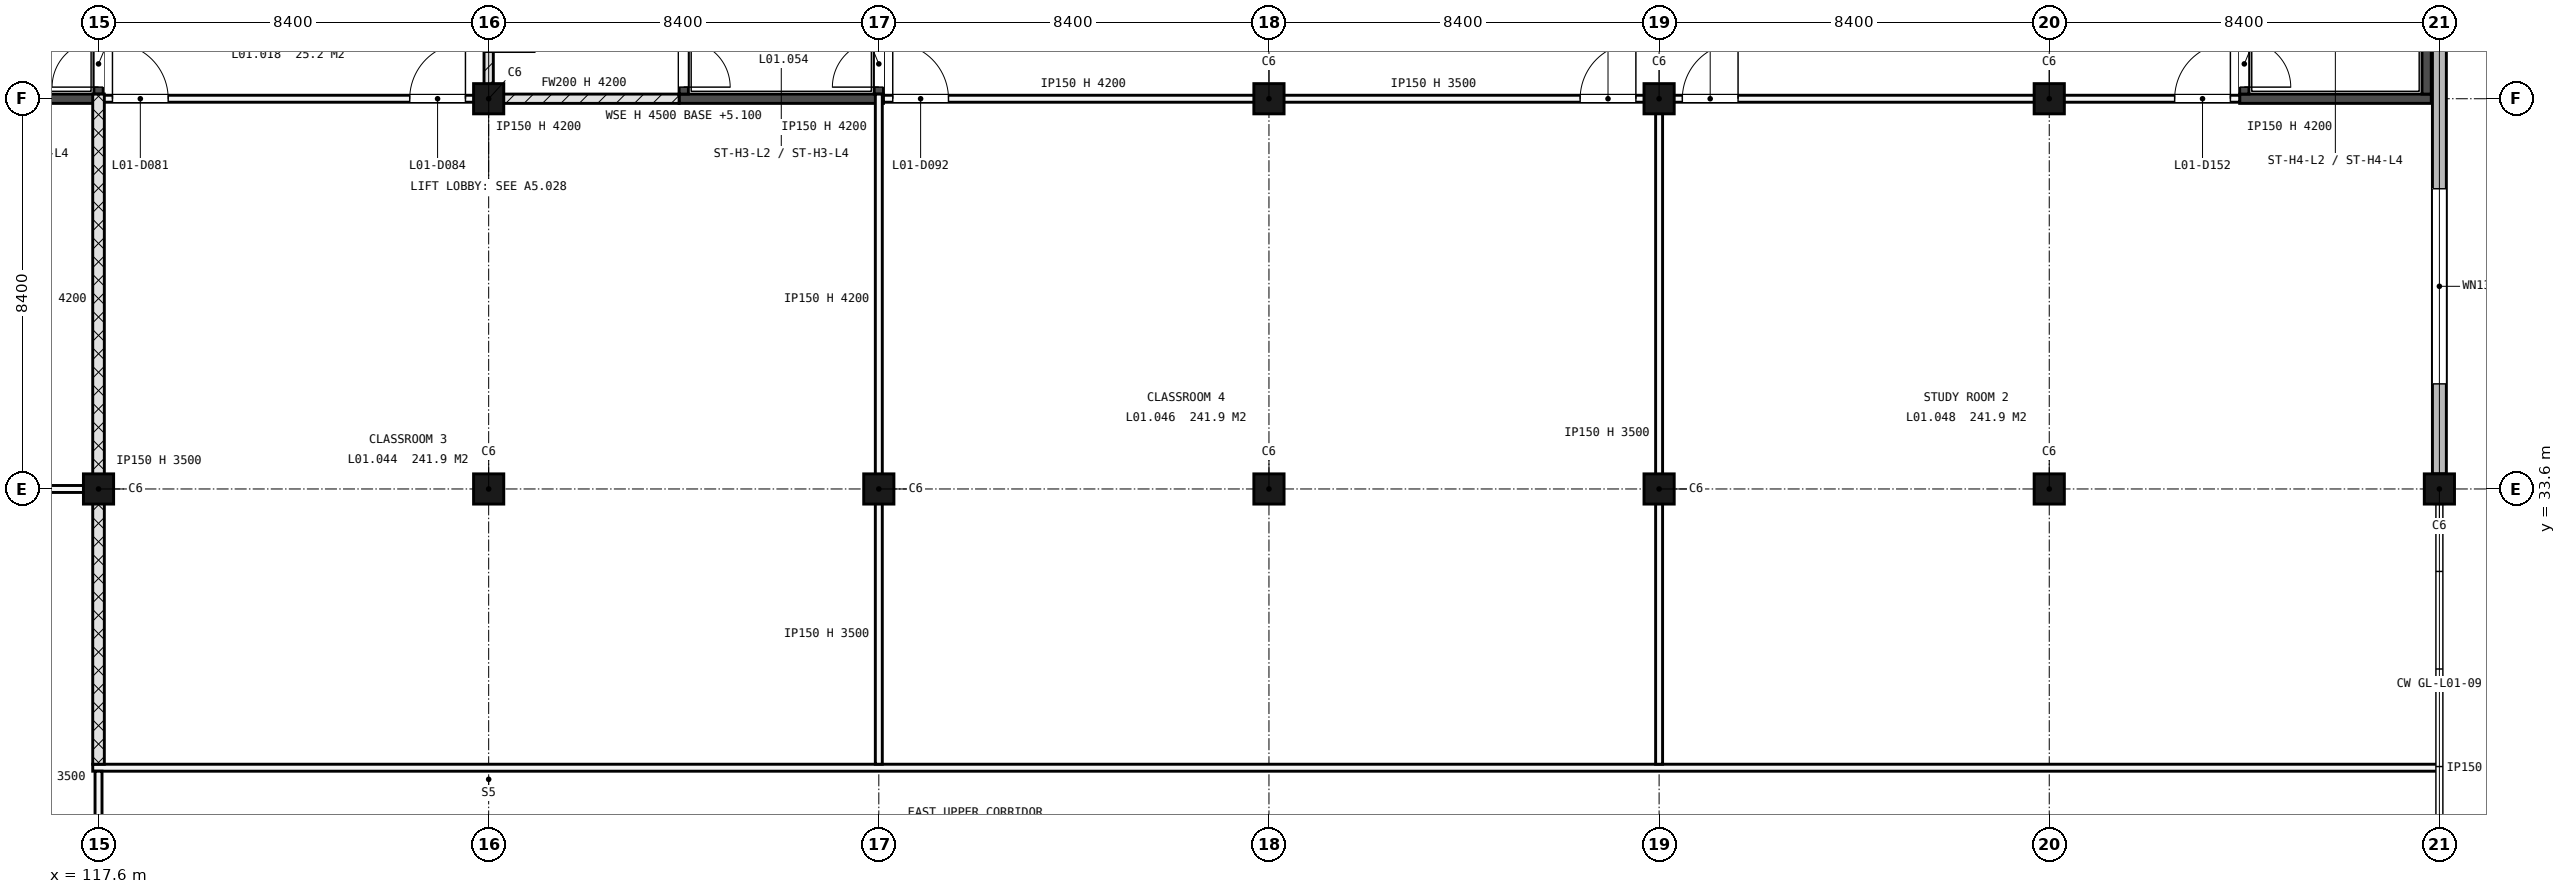
"""IFC4 building model, lengths in metres.
Left out: names, types, materials, properties, quantities, classifications, styles, units other than length and angle.
Written with IfcOpenShell. Run it as: python <this file> out.ifc"""

import sys

from ifc_helpers import new_model, si_unit, direction, frame, frame_2d, origin, origin_2d, place, context, subcontext, project, spatial, rectangle, extrude, element, fill, save


model = new_model("IFC4")
c1 = context("Model", 3, precision=1e-05, world=origin(), true_north=direction((0.0, 1.0)))
c2 = subcontext(c1, "Body", "Model", "MODEL_VIEW")
j1 = project(units=[si_unit("LENGTHUNIT", "METRE"), si_unit("PLANEANGLEUNIT", "RADIAN")], contexts=[c1])
p1 = place(None, origin())
s1 = spatial("IfcSite", under=j1, at=p1, CompositionType="ELEMENT")
p2 = place(p1, origin())
s2 = spatial("IfcBuilding", under=s1, at=p2, CompositionType="ELEMENT")
p3 = place(p2, frame((0.0, 0.0, 5.4)))
s3 = spatial("IfcBuildingStorey", under=s2, at=p3, CompositionType="ELEMENT", Elevation=5.4)
for number, where, z_axis, x_axis in (
    (1, (117.6, 33.6, -0.3), (0.0, 0.0, 1.0), (1.0, 0.0, 0.0)),
    (2, (126.0, 33.6, -0.3), (0.0, 0.0, 1.0), (1.0, 0.0, 0.0)),
    (3, (126.0, 42.0, -0.3), (0.0, 0.0, 1.0), (1.0, 0.0, 0.0)),
    (4, (134.4, 33.6, -0.3), (0.0, 0.0, 1.0), (1.0, 0.0, 0.0)),
    (5, (142.8, 33.6, -0.3), (0.0, 0.0, 1.0), (1.0, 0.0, 0.0)),
    (6, (142.8, 42.0, -0.3), (0.0, 0.0, 1.0), (1.0, 0.0, 0.0)),
    (7, (151.2, 33.6, -0.3), (0.0, 0.0, 1.0), (1.0, 0.0, 0.0)),
    (8, (151.2, 42.0, -0.3), (0.0, 0.0, 1.0), (1.0, 0.0, 0.0)),
    (9, (159.6, 33.6, -0.3), (0.0, 0.0, 1.0), (1.0, 0.0, 0.0)),
    (10, (159.6, 42.0, -0.3), (0.0, 0.0, 1.0), (1.0, 0.0, 0.0)),
    (11, (168.0, 33.6, -0.3), (0.0, 0.0, 1.0), (1.0, 0.0, 0.0)),
):
    element("IfcColumn", number, at=place(p3, frame(where, z_axis=z_axis, x_axis=x_axis)), inside=s3, PredefinedType="COLUMN", context=c2, shape_type="SweptSolid", body=[
        extrude(rectangle(XDim=0.65, YDim=0.65, at=origin_2d()), origin(), (0.0, 0.0, 1.0), 4.55),
    ])
p4 = place(p3, frame((168.0, 33.925, 0.0), z_axis=(0.0, 0.0, 1.0), x_axis=(0.0, 1.0, 0.0)))
e12 = element("IfcWall", 12, at=p4, inside=s3, PredefinedType="STANDARD", context=c2, shape_type="SweptSolid", body=[
    extrude(rectangle(XDim=16.475, YDim=0.3, at=frame_2d((8.237, 0.0))), origin(), (0.0, 0.0, 1.0), 4.2),
])
p5 = place(p4, frame((1.938, 0.0, 2.4)))
e13 = element("IfcOpeningElement", 13, at=p5, cuts=e12, PredefinedType="OPENING", context=c2, shape_type="SweptSolid", body=[
    extrude(rectangle(XDim=4.2, YDim=0.9, at=frame_2d((2.1, 0.45))), frame((0.0, 0.16, 0.0), z_axis=(0.0, -1.0, 0.0), x_axis=(1.0, 0.0, 0.0)), (0.0, 0.0, 1.0), 0.32),
])
p6 = place(p3, frame((130.1, 42.0, -0.3), z_axis=(0.0, 0.0, 1.0), x_axis=(1.0, 0.0, 0.0)))
e14 = element("IfcWall", 14, at=p6, inside=s3, PredefinedType="SHEAR", context=c2, shape_type="SweptSolid", body=[
    extrude(rectangle(XDim=4.4, YDim=0.2, at=frame_2d((2.2, 0.0))), origin(), (0.0, 0.0, 1.0), 4.5),
])
p7 = place(p3, frame((130.2, 42.1, -0.3), z_axis=(0.0, 0.0, 1.0), x_axis=(0.0, 1.0, 0.0)))
e15 = element("IfcWall", 15, at=p7, inside=s3, PredefinedType="SHEAR", context=c2, shape_type="SweptSolid", body=[
    extrude(rectangle(XDim=7.925, YDim=0.2, at=frame_2d((3.962, 0.0))), origin(), (0.0, 0.0, 1.0), 4.5),
])
p8 = place(p7, frame((0.15, 0.0, 0.3)))
e16 = element("IfcOpeningElement", 16, at=p8, cuts=e15, PredefinedType="OPENING", context=c2, shape_type="SweptSolid", body=[
    extrude(rectangle(XDim=1.0, YDim=2.1, at=frame_2d((0.5, 1.05))), frame((0.0, 0.11, 0.0), z_axis=(0.0, -1.0, 0.0), x_axis=(1.0, 0.0, 0.0)), (0.0, 0.0, 1.0), 0.22),
])
p9 = place(p3, frame((134.4, 42.1, -0.3), z_axis=(0.0, 0.0, 1.0), x_axis=(0.0, 1.0, 0.0)))
e17 = element("IfcWall", 17, at=p9, inside=s3, PredefinedType="SHEAR", context=c2, shape_type="SweptSolid", body=[
    extrude(rectangle(XDim=7.925, YDim=0.2, at=frame_2d((3.962, 0.0))), origin(), (0.0, 0.0, 1.0), 4.5),
])
p10 = place(p9, frame((0.15, 0.0, 0.3)))
e18 = element("IfcOpeningElement", 18, at=p10, cuts=e17, PredefinedType="OPENING", context=c2, shape_type="SweptSolid", body=[
    extrude(rectangle(XDim=1.0, YDim=2.1, at=frame_2d((0.5, 1.05))), frame((0.0, 0.11, 0.0), z_axis=(0.0, -1.0, 0.0), x_axis=(1.0, 0.0, 0.0)), (0.0, 0.0, 1.0), 0.22),
])
p11 = place(p3, frame((163.7, 42.0, -0.3), z_axis=(0.0, 0.0, 1.0), x_axis=(1.0, 0.0, 0.0)))
e19 = element("IfcWall", 19, at=p11, inside=s3, PredefinedType="SHEAR", context=c2, shape_type="SweptSolid", body=[
    extrude(rectangle(XDim=4.125, YDim=0.2, at=frame_2d((2.062, 0.0))), origin(), (0.0, 0.0, 1.0), 4.5),
])
p12 = place(p3, frame((163.8, 42.1, -0.3), z_axis=(0.0, 0.0, 1.0), x_axis=(0.0, 1.0, 0.0)))
e20 = element("IfcWall", 20, at=p12, inside=s3, PredefinedType="SHEAR", context=c2, shape_type="SweptSolid", body=[
    extrude(rectangle(XDim=7.925, YDim=0.2, at=frame_2d((3.962, 0.0))), origin(), (0.0, 0.0, 1.0), 4.5),
])
p13 = place(p12, frame((0.15, 0.0, 0.3)))
e21 = element("IfcOpeningElement", 21, at=p13, cuts=e20, PredefinedType="OPENING", context=c2, shape_type="SweptSolid", body=[
    extrude(rectangle(XDim=1.0, YDim=2.1, at=frame_2d((0.5, 1.05))), frame((0.0, 0.11, 0.0), z_axis=(0.0, -1.0, 0.0), x_axis=(1.0, 0.0, 0.0)), (0.0, 0.0, 1.0), 0.22),
])
p14 = place(p3, frame((167.725, 42.1, -0.3), z_axis=(0.0, 0.0, 1.0), x_axis=(0.0, 1.0, 0.0)))
e22 = element("IfcWall", 22, at=p14, inside=s3, PredefinedType="SHEAR", context=c2, shape_type="SweptSolid", body=[
    extrude(rectangle(XDim=7.925, YDim=0.2, at=frame_2d((3.962, 0.0))), origin(), (0.0, 0.0, 1.0), 4.5),
])
p15 = place(p3, frame((113.3, 42.0, -0.3), z_axis=(0.0, 0.0, 1.0), x_axis=(1.0, 0.0, 0.0)))
e23 = element("IfcWall", 23, at=p15, inside=s3, PredefinedType="SHEAR", context=c2, shape_type="SweptSolid", body=[
    extrude(rectangle(XDim=4.4, YDim=0.2, at=frame_2d((2.2, 0.0))), origin(), (0.0, 0.0, 1.0), 4.5),
])
p16 = place(p3, frame((117.6, 42.1, -0.3), z_axis=(0.0, 0.0, 1.0), x_axis=(0.0, 1.0, 0.0)))
e24 = element("IfcWall", 24, at=p16, inside=s3, PredefinedType="SHEAR", context=c2, shape_type="SweptSolid", body=[
    extrude(rectangle(XDim=7.925, YDim=0.2, at=frame_2d((3.962, 0.0))), origin(), (0.0, 0.0, 1.0), 4.5),
])
p17 = place(p16, frame((0.15, 0.0, 0.3)))
e25 = element("IfcOpeningElement", 25, at=p17, cuts=e24, PredefinedType="OPENING", context=c2, shape_type="SweptSolid", body=[
    extrude(rectangle(XDim=1.0, YDim=2.1, at=frame_2d((0.5, 1.05))), frame((0.0, 0.11, 0.0), z_axis=(0.0, -1.0, 0.0), x_axis=(1.0, 0.0, 0.0)), (0.0, 0.0, 1.0), 0.22),
])
p18 = place(p3, frame((117.475, 27.6, 0.0), z_axis=(0.0, 0.0, 1.0), x_axis=(1.0, 0.0, 0.0)))
e26 = element("IfcWall", 26, at=p18, inside=s3, PredefinedType="PARTITIONING", context=c2, shape_type="SweptSolid", body=[
    extrude(rectangle(XDim=50.525, YDim=0.15, at=frame_2d((25.262, 0.0))), origin(), (0.0, 0.0, 1.0), 4.2),
])
p19 = place(p3, frame((92.475, 33.6, 0.0), z_axis=(0.0, 0.0, 1.0), x_axis=(1.0, 0.0, 0.0)))
e27 = element("IfcWall", 27, at=p19, inside=s3, PredefinedType="PARTITIONING", context=c2, shape_type="SweptSolid", body=[
    extrude(rectangle(XDim=25.0, YDim=0.15, at=frame_2d((12.5, 0.0))), origin(), (0.0, 0.0, 1.0), 3.5),
])
p20 = place(p3, frame((117.7, 42.0, 0.0), z_axis=(0.0, 0.0, 1.0), x_axis=(1.0, 0.0, 0.0)))
e28 = element("IfcWall", 28, at=p20, inside=s3, PredefinedType="PARTITIONING", context=c2, shape_type="SweptSolid", body=[
    extrude(rectangle(XDim=8.3, YDim=0.15, at=frame_2d((4.15, 0.0))), origin(), (0.0, 0.0, 1.0), 4.2),
])
p21 = place(p20, frame((0.2, 0.0, 0.0)))
e29 = element("IfcOpeningElement", 29, at=p21, cuts=e28, PredefinedType="OPENING", context=c2, shape_type="SweptSolid", body=[
    extrude(rectangle(XDim=1.2, YDim=2.1, at=frame_2d((0.6, 1.05))), frame((0.0, 0.085, 0.0), z_axis=(0.0, -1.0, 0.0), x_axis=(1.0, 0.0, 0.0)), (0.0, 0.0, 1.0), 0.17),
])
p22 = place(p20, frame((6.6, 0.0, 0.0)))
e30 = element("IfcOpeningElement", 30, at=p22, cuts=e28, PredefinedType="OPENING", context=c2, shape_type="SweptSolid", body=[
    extrude(rectangle(XDim=1.2, YDim=2.1, at=frame_2d((0.6, 1.05))), frame((0.0, 0.085, 0.0), z_axis=(0.0, -1.0, 0.0), x_axis=(1.0, 0.0, 0.0)), (0.0, 0.0, 1.0), 0.17),
])
p23 = place(p3, frame((126.0, 42.0, 0.0), z_axis=(0.0, 0.0, 1.0), x_axis=(1.0, 0.0, 0.0)))
e31 = element("IfcWall", 31, at=p23, inside=s3, PredefinedType="SOLIDWALL", context=c2, shape_type="SweptSolid", body=[
    extrude(rectangle(XDim=4.1, YDim=0.2, at=frame_2d((2.05, 0.0))), origin(), (0.0, 0.0, 1.0), 4.2),
])
p24 = place(p3, frame((134.5, 42.0, 0.0), z_axis=(0.0, 0.0, 1.0), x_axis=(1.0, 0.0, 0.0)))
e32 = element("IfcWall", 32, at=p24, inside=s3, PredefinedType="PARTITIONING", context=c2, shape_type="SweptSolid", body=[
    extrude(rectangle(XDim=8.605, YDim=0.15, at=frame_2d((4.302, 0.0))), origin(), (0.0, 0.0, 1.0), 4.2),
])
p25 = place(p24, frame((0.2, 0.0, 0.0)))
e33 = element("IfcOpeningElement", 33, at=p25, cuts=e32, PredefinedType="OPENING", context=c2, shape_type="SweptSolid", body=[
    extrude(rectangle(XDim=1.2, YDim=2.1, at=frame_2d((0.6, 1.05))), frame((0.0, 0.085, 0.0), z_axis=(0.0, -1.0, 0.0), x_axis=(1.0, 0.0, 0.0)), (0.0, 0.0, 1.0), 0.17),
])
p26 = place(p3, frame((143.105, 42.0, 0.0), z_axis=(0.0, 0.0, 1.0), x_axis=(1.0, 0.0, 0.0)))
e34 = element("IfcWall", 34, at=p26, inside=s3, PredefinedType="PARTITIONING", context=c2, shape_type="SweptSolid", body=[
    extrude(rectangle(XDim=16.19, YDim=0.15, at=frame_2d((8.095, 0.0))), origin(), (0.0, 0.0, 1.0), 3.5),
])
p27 = place(p26, frame((6.395, 0.0, 0.0)))
e35 = element("IfcOpeningElement", 35, at=p27, cuts=e34, PredefinedType="OPENING", context=c2, shape_type="SweptSolid", body=[
    extrude(rectangle(XDim=1.2, YDim=2.1, at=frame_2d((0.6, 1.05))), frame((0.0, 0.085, 0.0), z_axis=(0.0, -1.0, 0.0), x_axis=(1.0, 0.0, 0.0)), (0.0, 0.0, 1.0), 0.17),
])
p28 = place(p26, frame((8.595, 0.0, 0.0)))
e36 = element("IfcOpeningElement", 36, at=p28, cuts=e34, PredefinedType="OPENING", context=c2, shape_type="SweptSolid", body=[
    extrude(rectangle(XDim=1.2, YDim=2.1, at=frame_2d((0.6, 1.05))), frame((0.0, 0.085, 0.0), z_axis=(0.0, -1.0, 0.0), x_axis=(1.0, 0.0, 0.0)), (0.0, 0.0, 1.0), 0.17),
])
p29 = place(p3, frame((159.295, 42.0, 0.0), z_axis=(0.0, 0.0, 1.0), x_axis=(1.0, 0.0, 0.0)))
e37 = element("IfcWall", 37, at=p29, inside=s3, PredefinedType="PARTITIONING", context=c2, shape_type="SweptSolid", body=[
    extrude(rectangle(XDim=4.405, YDim=0.15, at=frame_2d((2.203, 0.0))), origin(), (0.0, 0.0, 1.0), 4.2),
])
p30 = place(p29, frame((3.005, 0.0, 0.0)))
e38 = element("IfcOpeningElement", 38, at=p30, cuts=e37, PredefinedType="OPENING", context=c2, shape_type="SweptSolid", body=[
    extrude(rectangle(XDim=1.2, YDim=2.1, at=frame_2d((0.6, 1.05))), frame((0.0, 0.085, 0.0), z_axis=(0.0, -1.0, 0.0), x_axis=(1.0, 0.0, 0.0)), (0.0, 0.0, 1.0), 0.17),
])
p31 = place(p3, frame((117.6, 25.275, 0.0), z_axis=(0.0, 0.0, 1.0), x_axis=(0.0, 1.0, 0.0)))
e39 = element("IfcWall", 39, at=p31, inside=s3, PredefinedType="PARTITIONING", context=c2, shape_type="SweptSolid", body=[
    extrude(rectangle(XDim=2.25, YDim=0.15, at=frame_2d((1.125, 0.0))), origin(), (0.0, 0.0, 1.0), 3.5),
])
p32 = place(p3, frame((117.6, 27.675, 0.0), z_axis=(0.0, 0.0, 1.0), x_axis=(0.0, 1.0, 0.0)))
e40 = element("IfcWall", 40, at=p32, inside=s3, PredefinedType="SOLIDWALL", context=c2, shape_type="SweptSolid", body=[
    extrude(rectangle(XDim=5.62, YDim=0.25, at=frame_2d((2.81, 0.0))), origin(), (0.0, 0.0, 1.0), 3.5),
])
p33 = place(p3, frame((117.6, 33.295, 0.0), z_axis=(0.0, 0.0, 1.0), x_axis=(0.0, 1.0, 0.0)))
e41 = element("IfcWall", 41, at=p33, inside=s3, PredefinedType="SOLIDWALL", context=c2, shape_type="SweptSolid", body=[
    extrude(rectangle(XDim=8.805, YDim=0.25, at=frame_2d((4.403, 0.0))), origin(), (0.0, 0.0, 1.0), 4.2),
])
p34 = place(p3, frame((126.0, 42.1, 0.0), z_axis=(0.0, 0.0, 1.0), x_axis=(0.0, 1.0, 0.0)))
e42 = element("IfcWall", 42, at=p34, inside=s3, PredefinedType="SOLIDWALL", context=c2, shape_type="SweptSolid", body=[
    extrude(rectangle(XDim=8.3, YDim=0.2, at=frame_2d((4.15, 0.0))), origin(), (0.0, 0.0, 1.0), 3.5),
])
p35 = place(p34, frame((0.9, 0.0, 0.0)))
e43 = element("IfcOpeningElement", 43, at=p35, cuts=e42, PredefinedType="OPENING", context=c2, shape_type="SweptSolid", body=[
    extrude(rectangle(XDim=1.0, YDim=2.1, at=frame_2d((0.5, 1.05))), frame((0.0, 0.11, 0.0), z_axis=(0.0, -1.0, 0.0), x_axis=(1.0, 0.0, 0.0)), (0.0, 0.0, 1.0), 0.22),
])
p36 = place(p3, frame((134.4, 27.675, 0.0), z_axis=(0.0, 0.0, 1.0), x_axis=(0.0, 1.0, 0.0)))
e44 = element("IfcWall", 44, at=p36, inside=s3, PredefinedType="PARTITIONING", context=c2, shape_type="SweptSolid", body=[
    extrude(rectangle(XDim=5.62, YDim=0.15, at=frame_2d((2.81, 0.0))), origin(), (0.0, 0.0, 1.0), 3.5),
])
p37 = place(p3, frame((134.4, 33.295, 0.0), z_axis=(0.0, 0.0, 1.0), x_axis=(0.0, 1.0, 0.0)))
e45 = element("IfcWall", 45, at=p37, inside=s3, PredefinedType="PARTITIONING", context=c2, shape_type="SweptSolid", body=[
    extrude(rectangle(XDim=8.805, YDim=0.15, at=frame_2d((4.403, 0.0))), origin(), (0.0, 0.0, 1.0), 4.2),
])
p38 = place(p3, frame((151.2, 27.675, 0.0), z_axis=(0.0, 0.0, 1.0), x_axis=(0.0, 1.0, 0.0)))
e46 = element("IfcWall", 46, at=p38, inside=s3, PredefinedType="PARTITIONING", context=c2, shape_type="SweptSolid", body=[
    extrude(rectangle(XDim=14.25, YDim=0.15, at=frame_2d((7.125, 0.0))), origin(), (0.0, 0.0, 1.0), 3.5),
])
p39 = place(p5, origin())
e47 = element("IfcWindow", 47, at=p39, inside=s3, PartitioningType="SINGLE_PANEL", PredefinedType="WINDOW", context=c2, shape_type="SweptSolid", body=[
    extrude(rectangle(XDim=4.2, YDim=0.9, at=frame_2d((2.1, 0.45))), frame((0.0, 0.03, 0.0), z_axis=(0.0, -1.0, 0.0), x_axis=(1.0, 0.0, 0.0)), (0.0, 0.0, 1.0), 0.06),
])
fill(e13, e47)
p40 = place(p8, origin())
e48 = element("IfcDoor", 48, at=p40, inside=s3, OperationType="SINGLE_SWING_LEFT", PredefinedType="DOOR", context=c2, shape_type="SweptSolid", body=[
    extrude(rectangle(XDim=1.0, YDim=2.1, at=frame_2d((0.5, 1.05))), frame((0.0, 0.025, 0.0), z_axis=(0.0, -1.0, 0.0), x_axis=(1.0, 0.0, 0.0)), (0.0, 0.0, 1.0), 0.05),
])
fill(e16, e48)
p41 = place(p10, origin())
e49 = element("IfcDoor", 49, at=p41, inside=s3, OperationType="SINGLE_SWING_RIGHT", PredefinedType="DOOR", context=c2, shape_type="SweptSolid", body=[
    extrude(rectangle(XDim=1.0, YDim=2.1, at=frame_2d((0.5, 1.05))), frame((0.0, 0.025, 0.0), z_axis=(0.0, -1.0, 0.0), x_axis=(1.0, 0.0, 0.0)), (0.0, 0.0, 1.0), 0.05),
])
fill(e18, e49)
p42 = place(p13, origin())
e50 = element("IfcDoor", 50, at=p42, inside=s3, OperationType="SINGLE_SWING_LEFT", PredefinedType="DOOR", context=c2, shape_type="SweptSolid", body=[
    extrude(rectangle(XDim=1.0, YDim=2.1, at=frame_2d((0.5, 1.05))), frame((0.0, 0.025, 0.0), z_axis=(0.0, -1.0, 0.0), x_axis=(1.0, 0.0, 0.0)), (0.0, 0.0, 1.0), 0.05),
])
fill(e21, e50)
p43 = place(p17, origin())
e51 = element("IfcDoor", 51, at=p43, inside=s3, OperationType="SINGLE_SWING_RIGHT", PredefinedType="DOOR", context=c2, shape_type="SweptSolid", body=[
    extrude(rectangle(XDim=1.0, YDim=2.1, at=frame_2d((0.5, 1.05))), frame((0.0, 0.025, 0.0), z_axis=(0.0, -1.0, 0.0), x_axis=(1.0, 0.0, 0.0)), (0.0, 0.0, 1.0), 0.05),
])
fill(e25, e51)
p44 = place(p21, origin())
e52 = element("IfcDoor", 52, at=p44, inside=s3, OperationType="SINGLE_SWING_RIGHT", PredefinedType="DOOR", context=c2, shape_type="SweptSolid", body=[
    extrude(rectangle(XDim=1.2, YDim=2.1, at=frame_2d((0.6, 1.05))), frame((0.0, 0.025, 0.0), z_axis=(0.0, -1.0, 0.0), x_axis=(1.0, 0.0, 0.0)), (0.0, 0.0, 1.0), 0.05),
])
fill(e29, e52)
p45 = place(p22, origin())
e53 = element("IfcDoor", 53, at=p45, inside=s3, OperationType="SINGLE_SWING_LEFT", PredefinedType="DOOR", context=c2, shape_type="SweptSolid", body=[
    extrude(rectangle(XDim=1.2, YDim=2.1, at=frame_2d((0.6, 1.05))), frame((0.0, 0.025, 0.0), z_axis=(0.0, -1.0, 0.0), x_axis=(1.0, 0.0, 0.0)), (0.0, 0.0, 1.0), 0.05),
])
fill(e30, e53)
p46 = place(p25, origin())
e54 = element("IfcDoor", 54, at=p46, inside=s3, OperationType="SINGLE_SWING_RIGHT", PredefinedType="DOOR", context=c2, shape_type="SweptSolid", body=[
    extrude(rectangle(XDim=1.2, YDim=2.1, at=frame_2d((0.6, 1.05))), frame((0.0, 0.025, 0.0), z_axis=(0.0, -1.0, 0.0), x_axis=(1.0, 0.0, 0.0)), (0.0, 0.0, 1.0), 0.05),
])
fill(e33, e54)
p47 = place(p27, origin())
e55 = element("IfcDoor", 55, at=p47, inside=s3, OperationType="SINGLE_SWING_LEFT", PredefinedType="DOOR", context=c2, shape_type="SweptSolid", body=[
    extrude(rectangle(XDim=1.2, YDim=2.1, at=frame_2d((0.6, 1.05))), frame((0.0, 0.025, 0.0), z_axis=(0.0, -1.0, 0.0), x_axis=(1.0, 0.0, 0.0)), (0.0, 0.0, 1.0), 0.05),
])
fill(e35, e55)
p48 = place(p28, origin())
e56 = element("IfcDoor", 56, at=p48, inside=s3, OperationType="SINGLE_SWING_LEFT", PredefinedType="DOOR", context=c2, shape_type="SweptSolid", body=[
    extrude(rectangle(XDim=1.2, YDim=2.1, at=frame_2d((0.6, 1.05))), frame((0.0, 0.025, 0.0), z_axis=(0.0, -1.0, 0.0), x_axis=(1.0, 0.0, 0.0)), (0.0, 0.0, 1.0), 0.05),
])
fill(e36, e56)
p49 = place(p30, origin())
e57 = element("IfcDoor", 57, at=p49, inside=s3, OperationType="SINGLE_SWING_LEFT", PredefinedType="DOOR", context=c2, shape_type="SweptSolid", body=[
    extrude(rectangle(XDim=1.2, YDim=2.1, at=frame_2d((0.6, 1.05))), frame((0.0, 0.025, 0.0), z_axis=(0.0, -1.0, 0.0), x_axis=(1.0, 0.0, 0.0)), (0.0, 0.0, 1.0), 0.05),
])
fill(e38, e57)
save(model, sys.argv[1])
